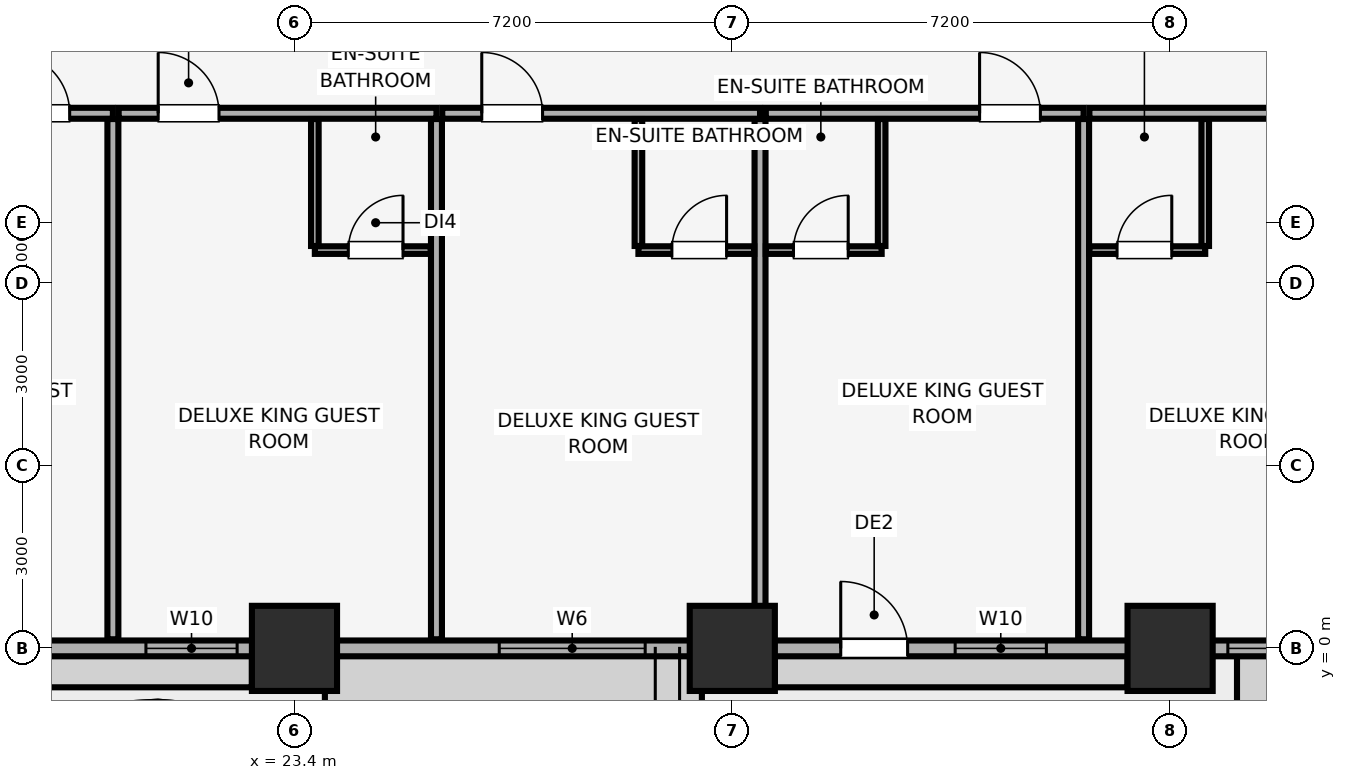
"""IFC4 building model, lengths in metres.
Left out: names, types, materials, properties, quantities, classifications, styles, units other than length and angle.
Written with IfcOpenShell. Run it as: python <this file> out.ifc"""

import sys

from ifc_helpers import new_model, si_unit, direction, frame, frame_2d, origin, origin_2d, place, context, subcontext, project, spatial, rectangle, extrude, element, fill, save


model = new_model("IFC4")
c1 = context("Model", 3, precision=1e-05, world=origin(), true_north=direction((0.0, 1.0)))
c2 = subcontext(c1, "Body", "Model", "MODEL_VIEW")
j1 = project(units=[si_unit("LENGTHUNIT", "METRE"), si_unit("PLANEANGLEUNIT", "RADIAN")], contexts=[c1])
p1 = place(None, origin())
s1 = spatial("IfcSite", under=j1, at=p1, CompositionType="ELEMENT")
p2 = place(p1, origin())
s2 = spatial("IfcBuilding", under=s1, at=p2, CompositionType="ELEMENT")
p3 = place(p2, frame((0.0, 0.0, 31.4)))
s3 = spatial("IfcBuildingStorey", under=s2, at=p3, CompositionType="ELEMENT", Elevation=31.4)
for number, where, z_axis, x_axis in (
    (1, (23.4, 0.0, 0.0), (0.0, 0.0, 1.0), (1.0, 0.0, 0.0)),
    (2, (30.6, 0.0, 0.0), (0.0, 0.0, 1.0), (1.0, 0.0, 0.0)),
    (3, (37.8, 0.0, 0.0), (0.0, 0.0, 1.0), (1.0, 0.0, 0.0)),
):
    element("IfcColumn", number, at=place(p3, frame(where, z_axis=z_axis, x_axis=x_axis)), inside=s3, PredefinedType="COLUMN", context=c2, shape_type="SweptSolid", body=[
        extrude(rectangle(XDim=1.4, YDim=1.4, at=origin_2d()), origin(), (0.0, 0.0, 1.0), 3.51),
    ])
p4 = place(p3, frame((4.2, 0.0, 0.0), z_axis=(0.0, 0.0, 1.0), x_axis=(1.0, 0.0, 0.0)))
e4 = element("IfcWall", 4, at=p4, inside=s3, PredefinedType="SOLIDWALL", context=c2, shape_type="SweptSolid", body=[
    extrude(rectangle(XDim=75.6, YDim=0.26, at=frame_2d((37.8, 0.0))), origin(), (0.0, 0.0, 1.0), 2.56),
])
p5 = place(p4, frame((13.517, 0.0, 0.0)))
e5 = element("IfcOpeningElement", 5, at=p5, cuts=e4, PredefinedType="OPENING", context=c2, shape_type="SweptSolid", body=[
    extrude(rectangle(XDim=1.1, YDim=2.15, at=frame_2d((0.55, 1.075))), frame((0.0, 0.14, 0.0), z_axis=(0.0, -1.0, 0.0), x_axis=(1.0, 0.0, 0.0)), (0.0, 0.0, 1.0), 0.28),
])
p6 = place(p4, frame((28.183, 0.0, 0.0)))
e6 = element("IfcOpeningElement", 6, at=p6, cuts=e4, PredefinedType="OPENING", context=c2, shape_type="SweptSolid", body=[
    extrude(rectangle(XDim=1.1, YDim=2.15, at=frame_2d((0.55, 1.075))), frame((0.0, 0.14, 0.0), z_axis=(0.0, -1.0, 0.0), x_axis=(1.0, 0.0, 0.0)), (0.0, 0.0, 1.0), 0.28),
])
p7 = place(p4, frame((60.983, 0.0, 0.0)))
e7 = element("IfcOpeningElement", 7, at=p7, cuts=e4, PredefinedType="OPENING", context=c2, shape_type="SweptSolid", body=[
    extrude(rectangle(XDim=1.1, YDim=2.15, at=frame_2d((0.55, 1.075))), frame((0.0, 0.14, 0.0), z_axis=(0.0, -1.0, 0.0), x_axis=(1.0, 0.0, 0.0)), (0.0, 0.0, 1.0), 0.28),
])
p8 = place(p4, frame((1.035, 0.0, 0.85)))
e8 = element("IfcOpeningElement", 8, at=p8, cuts=e4, PredefinedType="OPENING", context=c2, shape_type="SweptSolid", body=[
    extrude(rectangle(XDim=2.4, YDim=1.5, at=frame_2d((1.2, 0.75))), frame((0.0, 0.14, 0.0), z_axis=(0.0, -1.0, 0.0), x_axis=(1.0, 0.0, 0.0)), (0.0, 0.0, 1.0), 0.28),
])
p9 = place(p4, frame((7.031, 0.0, 0.85)))
e9 = element("IfcOpeningElement", 9, at=p9, cuts=e4, PredefinedType="OPENING", context=c2, shape_type="SweptSolid", body=[
    extrude(rectangle(XDim=2.4, YDim=1.5, at=frame_2d((1.2, 0.75))), frame((0.0, 0.14, 0.0), z_axis=(0.0, -1.0, 0.0), x_axis=(1.0, 0.0, 0.0)), (0.0, 0.0, 1.0), 0.28),
])
p10 = place(p4, frame((16.757, 0.0, 0.85)))
e10 = element("IfcOpeningElement", 10, at=p10, cuts=e4, PredefinedType="OPENING", context=c2, shape_type="SweptSolid", body=[
    extrude(rectangle(XDim=1.5, YDim=1.4, at=frame_2d((0.75, 0.7))), frame((0.0, 0.14, 0.0), z_axis=(0.0, -1.0, 0.0), x_axis=(1.0, 0.0, 0.0)), (0.0, 0.0, 1.0), 0.28),
])
p11 = place(p4, frame((22.567, 0.0, 0.85)))
e11 = element("IfcOpeningElement", 11, at=p11, cuts=e4, PredefinedType="OPENING", context=c2, shape_type="SweptSolid", body=[
    extrude(rectangle(XDim=2.4, YDim=1.5, at=frame_2d((1.2, 0.75))), frame((0.0, 0.14, 0.0), z_axis=(0.0, -1.0, 0.0), x_axis=(1.0, 0.0, 0.0)), (0.0, 0.0, 1.0), 0.28),
])
p12 = place(p4, frame((30.065, 0.0, 0.85)))
e12 = element("IfcOpeningElement", 12, at=p12, cuts=e4, PredefinedType="OPENING", context=c2, shape_type="SweptSolid", body=[
    extrude(rectangle(XDim=1.5, YDim=1.4, at=frame_2d((0.75, 0.7))), frame((0.0, 0.14, 0.0), z_axis=(0.0, -1.0, 0.0), x_axis=(1.0, 0.0, 0.0)), (0.0, 0.0, 1.0), 0.28),
])
p13 = place(p4, frame((34.55, 0.0, 0.85)))
e13 = element("IfcOpeningElement", 13, at=p13, cuts=e4, PredefinedType="OPENING", context=c2, shape_type="SweptSolid", body=[
    extrude(rectangle(XDim=2.4, YDim=1.5, at=frame_2d((1.2, 0.75))), frame((0.0, 0.14, 0.0), z_axis=(0.0, -1.0, 0.0), x_axis=(1.0, 0.0, 0.0)), (0.0, 0.0, 1.0), 0.28),
])
p14 = place(p4, frame((38.35, 0.0, 0.85)))
e14 = element("IfcOpeningElement", 14, at=p14, cuts=e4, PredefinedType="OPENING", context=c2, shape_type="SweptSolid", body=[
    extrude(rectangle(XDim=2.4, YDim=1.5, at=frame_2d((1.2, 0.75))), frame((0.0, 0.14, 0.0), z_axis=(0.0, -1.0, 0.0), x_axis=(1.0, 0.0, 0.0)), (0.0, 0.0, 1.0), 0.28),
])
p15 = place(p4, frame((44.281, 0.0, 0.85)))
e15 = element("IfcOpeningElement", 15, at=p15, cuts=e4, PredefinedType="OPENING", context=c2, shape_type="SweptSolid", body=[
    extrude(rectangle(XDim=2.4, YDim=1.5, at=frame_2d((1.2, 0.75))), frame((0.0, 0.14, 0.0), z_axis=(0.0, -1.0, 0.0), x_axis=(1.0, 0.0, 0.0)), (0.0, 0.0, 1.0), 0.28),
])
p16 = place(p4, frame((50.332, 0.0, 0.85)))
e16 = element("IfcOpeningElement", 16, at=p16, cuts=e4, PredefinedType="OPENING", context=c2, shape_type="SweptSolid", body=[
    extrude(rectangle(XDim=2.4, YDim=1.5, at=frame_2d((1.2, 0.75))), frame((0.0, 0.14, 0.0), z_axis=(0.0, -1.0, 0.0), x_axis=(1.0, 0.0, 0.0)), (0.0, 0.0, 1.0), 0.28),
])
p17 = place(p4, frame((53.981, 0.0, 0.85)))
e17 = element("IfcOpeningElement", 17, at=p17, cuts=e4, PredefinedType="OPENING", context=c2, shape_type="SweptSolid", body=[
    extrude(rectangle(XDim=1.5, YDim=1.4, at=frame_2d((0.75, 0.7))), frame((0.0, 0.14, 0.0), z_axis=(0.0, -1.0, 0.0), x_axis=(1.0, 0.0, 0.0)), (0.0, 0.0, 1.0), 0.28),
])
p18 = place(p4, frame((64.759, 0.0, 0.85)))
e18 = element("IfcOpeningElement", 18, at=p18, cuts=e4, PredefinedType="OPENING", context=c2, shape_type="SweptSolid", body=[
    extrude(rectangle(XDim=1.5, YDim=1.4, at=frame_2d((0.75, 0.7))), frame((0.0, 0.14, 0.0), z_axis=(0.0, -1.0, 0.0), x_axis=(1.0, 0.0, 0.0)), (0.0, 0.0, 1.0), 0.28),
])
p19 = place(p4, frame((67.509, 0.0, 0.85)))
e19 = element("IfcOpeningElement", 19, at=p19, cuts=e4, PredefinedType="OPENING", context=c2, shape_type="SweptSolid", body=[
    extrude(rectangle(XDim=2.4, YDim=1.5, at=frame_2d((1.2, 0.75))), frame((0.0, 0.14, 0.0), z_axis=(0.0, -1.0, 0.0), x_axis=(1.0, 0.0, 0.0)), (0.0, 0.0, 1.0), 0.28),
])
p20 = place(p4, frame((72.165, 0.0, 0.85)))
e20 = element("IfcOpeningElement", 20, at=p20, cuts=e4, PredefinedType="OPENING", context=c2, shape_type="SweptSolid", body=[
    extrude(rectangle(XDim=2.4, YDim=1.5, at=frame_2d((1.2, 0.75))), frame((0.0, 0.14, 0.0), z_axis=(0.0, -1.0, 0.0), x_axis=(1.0, 0.0, 0.0)), (0.0, 0.0, 1.0), 0.28),
])
p21 = place(p3, frame((15.188, 8.8, 0.0), z_axis=(0.0, 0.0, 1.0), x_axis=(1.0, 0.0, 0.0)))
e21 = element("IfcWall", 21, at=p21, inside=s3, PredefinedType="PARTITIONING", context=c2, shape_type="SweptSolid", body=[
    extrude(rectangle(XDim=5.226, YDim=0.18, at=frame_2d((2.613, 0.0))), origin(), (0.0, 0.0, 1.0), 3.51),
])
p22 = place(p21, frame((3.516, 0.0, 0.0)))
e22 = element("IfcOpeningElement", 22, at=p22, cuts=e21, PredefinedType="OPENING", context=c2, shape_type="SweptSolid", body=[
    extrude(rectangle(XDim=1.0, YDim=2.15, at=frame_2d((0.5, 1.075))), frame((0.0, 0.1, 0.0), z_axis=(0.0, -1.0, 0.0), x_axis=(1.0, 0.0, 0.0)), (0.0, 0.0, 1.0), 0.2),
])
p23 = place(p3, frame((20.414, 0.15, 0.0), z_axis=(0.0, 0.0, 1.0), x_axis=(0.0, 1.0, 0.0)))
e23 = element("IfcWall", 23, at=p23, inside=s3, PredefinedType="PARTITIONING", context=c2, shape_type="SweptSolid", body=[
    extrude(rectangle(XDim=8.555, YDim=0.18, at=frame_2d((4.278, 0.0))), origin(), (0.0, 0.0, 1.0), 3.51),
])
p24 = place(p3, frame((20.509, 8.8, 0.0), z_axis=(0.0, 0.0, 1.0), x_axis=(1.0, 0.0, 0.0)))
e24 = element("IfcWall", 24, at=p24, inside=s3, PredefinedType="PARTITIONING", context=c2, shape_type="SweptSolid", body=[
    extrude(rectangle(XDim=5.226, YDim=0.18, at=frame_2d((2.613, 0.0))), origin(), (0.0, 0.0, 1.0), 3.51),
])
p25 = place(p24, frame((0.65, 0.0, 0.0)))
e25 = element("IfcOpeningElement", 25, at=p25, cuts=e24, PredefinedType="OPENING", context=c2, shape_type="SweptSolid", body=[
    extrude(rectangle(XDim=1.0, YDim=2.15, at=frame_2d((0.5, 1.075))), frame((0.0, 0.1, 0.0), z_axis=(0.0, -1.0, 0.0), x_axis=(1.0, 0.0, 0.0)), (0.0, 0.0, 1.0), 0.2),
])
p26 = place(p3, frame((25.735, 0.15, 0.0), z_axis=(0.0, 0.0, 1.0), x_axis=(0.0, 1.0, 0.0)))
e26 = element("IfcWall", 26, at=p26, inside=s3, PredefinedType="PARTITIONING", context=c2, shape_type="SweptSolid", body=[
    extrude(rectangle(XDim=8.555, YDim=0.18, at=frame_2d((4.278, 0.0))), origin(), (0.0, 0.0, 1.0), 3.51),
])
p27 = place(p3, frame((23.735, 6.55, 0.0), z_axis=(0.0, 0.0, 1.0), x_axis=(1.0, 0.0, 0.0)))
e27 = element("IfcWall", 27, at=p27, inside=s3, PredefinedType="PARTITIONING", context=c2, shape_type="SweptSolid", body=[
    extrude(rectangle(XDim=1.905, YDim=0.125, at=frame_2d((0.952, 0.0))), origin(), (0.0, 0.0, 1.0), 3.51),
])
p28 = place(p27, frame((0.55, 0.0, 0.0)))
e28 = element("IfcOpeningElement", 28, at=p28, cuts=e27, PredefinedType="OPENING", context=c2, shape_type="SweptSolid", body=[
    extrude(rectangle(XDim=0.9, YDim=2.1, at=frame_2d((0.45, 1.05))), frame((0.0, 0.073, 0.0), z_axis=(0.0, -1.0, 0.0), x_axis=(1.0, 0.0, 0.0)), (0.0, 0.0, 1.0), 0.145),
])
p29 = place(p3, frame((23.735, 6.617, 0.0), z_axis=(0.0, 0.0, 1.0), x_axis=(0.0, 1.0, 0.0)))
e29 = element("IfcWall", 29, at=p29, inside=s3, PredefinedType="PARTITIONING", context=c2, shape_type="SweptSolid", body=[
    extrude(rectangle(XDim=2.088, YDim=0.125, at=frame_2d((1.044, 0.0))), origin(), (0.0, 0.0, 1.0), 3.51),
])
p30 = place(p3, frame((25.83, 8.8, 0.0), z_axis=(0.0, 0.0, 1.0), x_axis=(1.0, 0.0, 0.0)))
e30 = element("IfcWall", 30, at=p30, inside=s3, PredefinedType="PARTITIONING", context=c2, shape_type="SweptSolid", body=[
    extrude(rectangle(XDim=5.226, YDim=0.18, at=frame_2d((2.613, 0.0))), origin(), (0.0, 0.0, 1.0), 3.51),
])
p31 = place(p30, frame((0.65, 0.0, 0.0)))
e31 = element("IfcOpeningElement", 31, at=p31, cuts=e30, PredefinedType="OPENING", context=c2, shape_type="SweptSolid", body=[
    extrude(rectangle(XDim=1.0, YDim=2.15, at=frame_2d((0.5, 1.075))), frame((0.0, 0.1, 0.0), z_axis=(0.0, -1.0, 0.0), x_axis=(1.0, 0.0, 0.0)), (0.0, 0.0, 1.0), 0.2),
])
p32 = place(p3, frame((31.056, 0.15, 0.0), z_axis=(0.0, 0.0, 1.0), x_axis=(0.0, 1.0, 0.0)))
e32 = element("IfcWall", 32, at=p32, inside=s3, PredefinedType="PARTITIONING", context=c2, shape_type="SweptSolid", body=[
    extrude(rectangle(XDim=8.555, YDim=0.18, at=frame_2d((4.278, 0.0))), origin(), (0.0, 0.0, 1.0), 2.88),
])
p33 = place(p3, frame((29.056, 6.55, 0.0), z_axis=(0.0, 0.0, 1.0), x_axis=(1.0, 0.0, 0.0)))
e33 = element("IfcWall", 33, at=p33, inside=s3, PredefinedType="PARTITIONING", context=c2, shape_type="SweptSolid", body=[
    extrude(rectangle(XDim=1.905, YDim=0.125, at=frame_2d((0.952, 0.0))), origin(), (0.0, 0.0, 1.0), 3.51),
])
p34 = place(p33, frame((0.55, 0.0, 0.0)))
e34 = element("IfcOpeningElement", 34, at=p34, cuts=e33, PredefinedType="OPENING", context=c2, shape_type="SweptSolid", body=[
    extrude(rectangle(XDim=0.9, YDim=2.1, at=frame_2d((0.45, 1.05))), frame((0.0, 0.073, 0.0), z_axis=(0.0, -1.0, 0.0), x_axis=(1.0, 0.0, 0.0)), (0.0, 0.0, 1.0), 0.145),
])
p35 = place(p3, frame((29.056, 6.617, 0.0), z_axis=(0.0, 0.0, 1.0), x_axis=(0.0, 1.0, 0.0)))
e35 = element("IfcWall", 35, at=p35, inside=s3, PredefinedType="PARTITIONING", context=c2, shape_type="SweptSolid", body=[
    extrude(rectangle(XDim=2.088, YDim=0.125, at=frame_2d((1.044, 0.0))), origin(), (0.0, 0.0, 1.0), 3.51),
])
p36 = place(p3, frame((31.151, 8.8, 0.0), z_axis=(0.0, 0.0, 1.0), x_axis=(1.0, 0.0, 0.0)))
e36 = element("IfcWall", 36, at=p36, inside=s3, PredefinedType="PARTITIONING", context=c2, shape_type="SweptSolid", body=[
    extrude(rectangle(XDim=5.226, YDim=0.18, at=frame_2d((2.613, 0.0))), origin(), (0.0, 0.0, 1.0), 3.51),
])
p37 = place(p36, frame((3.516, 0.0, 0.0)))
e37 = element("IfcOpeningElement", 37, at=p37, cuts=e36, PredefinedType="OPENING", context=c2, shape_type="SweptSolid", body=[
    extrude(rectangle(XDim=1.0, YDim=2.15, at=frame_2d((0.5, 1.075))), frame((0.0, 0.1, 0.0), z_axis=(0.0, -1.0, 0.0), x_axis=(1.0, 0.0, 0.0)), (0.0, 0.0, 1.0), 0.2),
])
p38 = place(p3, frame((36.377, 0.15, 0.0), z_axis=(0.0, 0.0, 1.0), x_axis=(0.0, 1.0, 0.0)))
e38 = element("IfcWall", 38, at=p38, inside=s3, PredefinedType="PARTITIONING", context=c2, shape_type="SweptSolid", body=[
    extrude(rectangle(XDim=8.555, YDim=0.18, at=frame_2d((4.278, 0.0))), origin(), (0.0, 0.0, 1.0), 3.51),
])
p39 = place(p3, frame((31.151, 6.55, 0.0), z_axis=(0.0, 0.0, 1.0), x_axis=(1.0, 0.0, 0.0)))
e39 = element("IfcWall", 39, at=p39, inside=s3, PredefinedType="PARTITIONING", context=c2, shape_type="SweptSolid", body=[
    extrude(rectangle(XDim=1.905, YDim=0.125, at=frame_2d((0.953, 0.0))), origin(), (0.0, 0.0, 1.0), 3.51),
])
p40 = place(p39, frame((0.455, 0.0, 0.0)))
e40 = element("IfcOpeningElement", 40, at=p40, cuts=e39, PredefinedType="OPENING", context=c2, shape_type="SweptSolid", body=[
    extrude(rectangle(XDim=0.9, YDim=2.1, at=frame_2d((0.45, 1.05))), frame((0.0, 0.073, 0.0), z_axis=(0.0, -1.0, 0.0), x_axis=(1.0, 0.0, 0.0)), (0.0, 0.0, 1.0), 0.145),
])
p41 = place(p3, frame((33.056, 6.617, 0.0), z_axis=(0.0, 0.0, 1.0), x_axis=(0.0, 1.0, 0.0)))
e41 = element("IfcWall", 41, at=p41, inside=s3, PredefinedType="PARTITIONING", context=c2, shape_type="SweptSolid", body=[
    extrude(rectangle(XDim=2.088, YDim=0.125, at=frame_2d((1.044, 0.0))), origin(), (0.0, 0.0, 1.0), 3.51),
])
p42 = place(p3, frame((36.472, 8.8, 0.0), z_axis=(0.0, 0.0, 1.0), x_axis=(1.0, 0.0, 0.0)))
e42 = element("IfcWall", 42, at=p42, inside=s3, PredefinedType="PARTITIONING", context=c2, shape_type="SweptSolid", body=[
    extrude(rectangle(XDim=5.226, YDim=0.18, at=frame_2d((2.613, 0.0))), origin(), (0.0, 0.0, 1.0), 3.51),
])
p43 = place(p42, frame((3.516, 0.0, 0.0)))
e43 = element("IfcOpeningElement", 43, at=p43, cuts=e42, PredefinedType="OPENING", context=c2, shape_type="SweptSolid", body=[
    extrude(rectangle(XDim=1.0, YDim=2.15, at=frame_2d((0.5, 1.075))), frame((0.0, 0.1, 0.0), z_axis=(0.0, -1.0, 0.0), x_axis=(1.0, 0.0, 0.0)), (0.0, 0.0, 1.0), 0.2),
])
p44 = place(p3, frame((36.472, 6.55, 0.0), z_axis=(0.0, 0.0, 1.0), x_axis=(1.0, 0.0, 0.0)))
e44 = element("IfcWall", 44, at=p44, inside=s3, PredefinedType="PARTITIONING", context=c2, shape_type="SweptSolid", body=[
    extrude(rectangle(XDim=1.905, YDim=0.125, at=frame_2d((0.953, 0.0))), origin(), (0.0, 0.0, 1.0), 3.51),
])
p45 = place(p44, frame((0.455, 0.0, 0.0)))
e45 = element("IfcOpeningElement", 45, at=p45, cuts=e44, PredefinedType="OPENING", context=c2, shape_type="SweptSolid", body=[
    extrude(rectangle(XDim=0.9, YDim=2.1, at=frame_2d((0.45, 1.05))), frame((0.0, 0.073, 0.0), z_axis=(0.0, -1.0, 0.0), x_axis=(1.0, 0.0, 0.0)), (0.0, 0.0, 1.0), 0.145),
])
p46 = place(p3, frame((38.377, 6.617, 0.0), z_axis=(0.0, 0.0, 1.0), x_axis=(0.0, 1.0, 0.0)))
e46 = element("IfcWall", 46, at=p46, inside=s3, PredefinedType="PARTITIONING", context=c2, shape_type="SweptSolid", body=[
    extrude(rectangle(XDim=2.088, YDim=0.125, at=frame_2d((1.044, 0.0))), origin(), (0.0, 0.0, 1.0), 3.51),
])
p47 = place(p6, origin())
e47 = element("IfcDoor", 47, at=p47, inside=s3, OperationType="SINGLE_SWING_LEFT", PredefinedType="DOOR", context=c2, shape_type="SweptSolid", body=[
    extrude(rectangle(XDim=1.1, YDim=2.15, at=frame_2d((0.55, 1.075))), frame((0.0, 0.025, 0.0), z_axis=(0.0, -1.0, 0.0), x_axis=(1.0, 0.0, 0.0)), (0.0, 0.0, 1.0), 0.05),
])
fill(e6, e47)
p48 = place(p10, origin())
e48 = element("IfcWindow", 48, at=p48, inside=s3, PartitioningType="SINGLE_PANEL", PredefinedType="WINDOW", context=c2, shape_type="SweptSolid", body=[
    extrude(rectangle(XDim=1.5, YDim=1.4, at=frame_2d((0.75, 0.7))), frame((0.0, 0.03, 0.0), z_axis=(0.0, -1.0, 0.0), x_axis=(1.0, 0.0, 0.0)), (0.0, 0.0, 1.0), 0.06),
])
fill(e10, e48)
p49 = place(p11, origin())
e49 = element("IfcWindow", 49, at=p49, inside=s3, PartitioningType="SINGLE_PANEL", PredefinedType="WINDOW", context=c2, shape_type="SweptSolid", body=[
    extrude(rectangle(XDim=2.4, YDim=1.5, at=frame_2d((1.2, 0.75))), frame((0.0, 0.03, 0.0), z_axis=(0.0, -1.0, 0.0), x_axis=(1.0, 0.0, 0.0)), (0.0, 0.0, 1.0), 0.06),
])
fill(e11, e49)
p50 = place(p12, origin())
e50 = element("IfcWindow", 50, at=p50, inside=s3, PartitioningType="SINGLE_PANEL", PredefinedType="WINDOW", context=c2, shape_type="SweptSolid", body=[
    extrude(rectangle(XDim=1.5, YDim=1.4, at=frame_2d((0.75, 0.7))), frame((0.0, 0.03, 0.0), z_axis=(0.0, -1.0, 0.0), x_axis=(1.0, 0.0, 0.0)), (0.0, 0.0, 1.0), 0.06),
])
fill(e12, e50)
p51 = place(p13, origin())
e51 = element("IfcWindow", 51, at=p51, inside=s3, PartitioningType="SINGLE_PANEL", PredefinedType="WINDOW", context=c2, shape_type="SweptSolid", body=[
    extrude(rectangle(XDim=2.4, YDim=1.5, at=frame_2d((1.2, 0.75))), frame((0.0, 0.03, 0.0), z_axis=(0.0, -1.0, 0.0), x_axis=(1.0, 0.0, 0.0)), (0.0, 0.0, 1.0), 0.06),
])
fill(e13, e51)
p52 = place(p22, origin())
e52 = element("IfcDoor", 52, at=p52, inside=s3, OperationType="SINGLE_SWING_LEFT", PredefinedType="DOOR", context=c2, shape_type="SweptSolid", body=[
    extrude(rectangle(XDim=1.0, YDim=2.15, at=frame_2d((0.5, 1.075))), frame((0.0, 0.025, 0.0), z_axis=(0.0, -1.0, 0.0), x_axis=(1.0, 0.0, 0.0)), (0.0, 0.0, 1.0), 0.05),
])
fill(e22, e52)
p53 = place(p25, origin())
e53 = element("IfcDoor", 53, at=p53, inside=s3, OperationType="SINGLE_SWING_LEFT", PredefinedType="DOOR", context=c2, shape_type="SweptSolid", body=[
    extrude(rectangle(XDim=1.0, YDim=2.15, at=frame_2d((0.5, 1.075))), frame((0.0, 0.025, 0.0), z_axis=(0.0, -1.0, 0.0), x_axis=(1.0, 0.0, 0.0)), (0.0, 0.0, 1.0), 0.05),
])
fill(e25, e53)
p54 = place(p28, origin())
e54 = element("IfcDoor", 54, at=p54, inside=s3, OperationType="SINGLE_SWING_RIGHT", PredefinedType="DOOR", context=c2, shape_type="SweptSolid", body=[
    extrude(rectangle(XDim=0.9, YDim=2.1, at=frame_2d((0.45, 1.05))), frame((0.0, 0.025, 0.0), z_axis=(0.0, -1.0, 0.0), x_axis=(1.0, 0.0, 0.0)), (0.0, 0.0, 1.0), 0.05),
])
fill(e28, e54)
p55 = place(p31, origin())
e55 = element("IfcDoor", 55, at=p55, inside=s3, OperationType="SINGLE_SWING_LEFT", PredefinedType="DOOR", context=c2, shape_type="SweptSolid", body=[
    extrude(rectangle(XDim=1.0, YDim=2.15, at=frame_2d((0.5, 1.075))), frame((0.0, 0.025, 0.0), z_axis=(0.0, -1.0, 0.0), x_axis=(1.0, 0.0, 0.0)), (0.0, 0.0, 1.0), 0.05),
])
fill(e31, e55)
p56 = place(p34, origin())
e56 = element("IfcDoor", 56, at=p56, inside=s3, OperationType="SINGLE_SWING_RIGHT", PredefinedType="DOOR", context=c2, shape_type="SweptSolid", body=[
    extrude(rectangle(XDim=0.9, YDim=2.1, at=frame_2d((0.45, 1.05))), frame((0.0, 0.025, 0.0), z_axis=(0.0, -1.0, 0.0), x_axis=(1.0, 0.0, 0.0)), (0.0, 0.0, 1.0), 0.05),
])
fill(e34, e56)
p57 = place(p37, origin())
e57 = element("IfcDoor", 57, at=p57, inside=s3, OperationType="SINGLE_SWING_LEFT", PredefinedType="DOOR", context=c2, shape_type="SweptSolid", body=[
    extrude(rectangle(XDim=1.0, YDim=2.15, at=frame_2d((0.5, 1.075))), frame((0.0, 0.025, 0.0), z_axis=(0.0, -1.0, 0.0), x_axis=(1.0, 0.0, 0.0)), (0.0, 0.0, 1.0), 0.05),
])
fill(e37, e57)
p58 = place(p40, origin())
e58 = element("IfcDoor", 58, at=p58, inside=s3, OperationType="SINGLE_SWING_RIGHT", PredefinedType="DOOR", context=c2, shape_type="SweptSolid", body=[
    extrude(rectangle(XDim=0.9, YDim=2.1, at=frame_2d((0.45, 1.05))), frame((0.0, 0.025, 0.0), z_axis=(0.0, -1.0, 0.0), x_axis=(1.0, 0.0, 0.0)), (0.0, 0.0, 1.0), 0.05),
])
fill(e40, e58)
p59 = place(p45, origin())
e59 = element("IfcDoor", 59, at=p59, inside=s3, OperationType="SINGLE_SWING_RIGHT", PredefinedType="DOOR", context=c2, shape_type="SweptSolid", body=[
    extrude(rectangle(XDim=0.9, YDim=2.1, at=frame_2d((0.45, 1.05))), frame((0.0, 0.025, 0.0), z_axis=(0.0, -1.0, 0.0), x_axis=(1.0, 0.0, 0.0)), (0.0, 0.0, 1.0), 0.05),
])
fill(e45, e59)
save(model, sys.argv[1])
